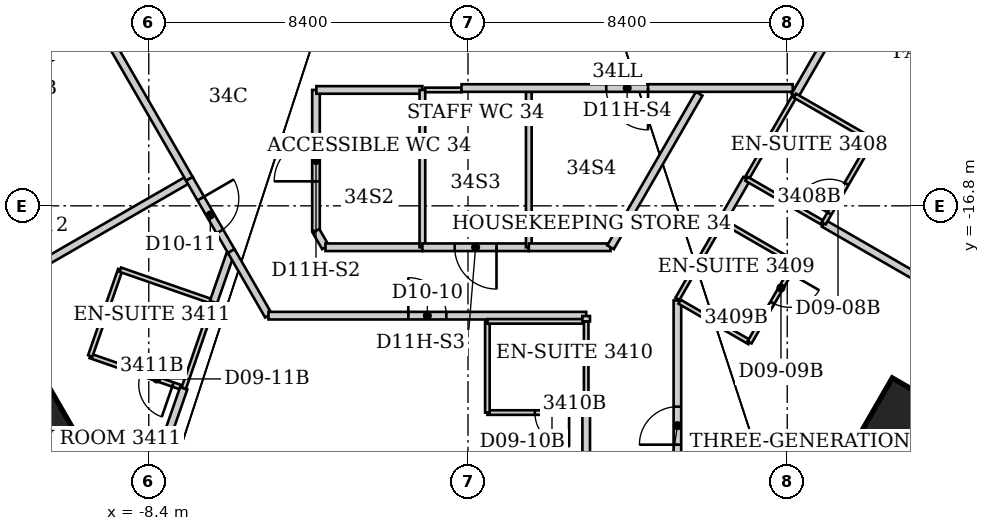
"""IFC4 building model, lengths in metres.
Left out: names, types, materials, properties, quantities, classifications, styles, units other than length and angle.
Written with IfcOpenShell. Run it as: python <this file> out.ifc"""

import sys

from ifc_helpers import new_model, si_unit, direction, frame, frame_2d, origin, origin_2d, place, context, subcontext, project, spatial, rectangle, extrude, element, fill, save


model = new_model("IFC4")
c1 = context("Model", 3, precision=1e-05, world=origin(), true_north=direction((0.0, 1.0)))
c2 = subcontext(c1, "Body", "Model", "MODEL_VIEW")
j1 = project(units=[si_unit("LENGTHUNIT", "METRE"), si_unit("PLANEANGLEUNIT", "RADIAN")], contexts=[c1])
p1 = place(None, origin())
s1 = spatial("IfcSite", under=j1, at=p1, CompositionType="ELEMENT")
p2 = place(p1, origin())
s2 = spatial("IfcBuilding", under=s1, at=p2, CompositionType="ELEMENT")
p3 = place(p2, frame((0.0, 0.0, 138.6)))
s3 = spatial("IfcBuildingStorey", under=s2, at=p3, CompositionType="ELEMENT", Elevation=138.6)
for number, where, z_axis, x_axis in (
    (1, (11.494, -22.559, 0.0), (0.0, 0.0, 1.0), (0.866, -0.5, 0.0)),
    (2, (-11.494, -22.559, 0.0), (0.0, 0.0, 1.0), (-0.866, -0.5, 0.0)),
):
    element("IfcColumn", number, at=place(p3, frame(where, z_axis=z_axis, x_axis=x_axis)), inside=s3, PredefinedType="COLUMN", context=c2, shape_type="SweptSolid", body=[
        extrude(rectangle(XDim=1.8, YDim=1.8, at=origin_2d()), origin(), (0.0, 0.0, 1.0), 3.8),
    ])
p4 = place(p3, frame((-14.246, -20.08, 0.0), z_axis=(0.0, 0.0, 1.0), x_axis=(0.866178955952, 0.49973394548, 0.0)))
e3 = element("IfcWall", 3, at=p4, inside=s3, PredefinedType="PARTITIONING", context=c2, shape_type="SweptSolid", body=[
    extrude(rectangle(XDim=7.969, YDim=0.2, at=frame_2d((3.985, 0.0))), origin(), (0.0, 0.0, 1.0), 3.64),
])
p5 = place(p3, frame((-11.58, -13.27, 0.0), z_axis=(0.0, 0.0, 1.0), x_axis=(0.867428373024, 0.497562074192, 0.0)))
e4 = element("IfcWall", 4, at=p5, inside=s3, PredefinedType="PARTITIONING", context=c2, shape_type="SweptSolid", body=[
    extrude(rectangle(XDim=2.271, YDim=0.12, at=frame_2d((1.136, 0.0))), origin(), (0.0, 0.0, 1.0), 3.64),
])
p6 = place(p3, frame((-9.94, -20.75, 0.0), z_axis=(0.0, 0.0, 1.0), x_axis=(0.94515546045, -0.326620813149, 0.0)))
e5 = element("IfcWall", 5, at=p6, inside=s3, PredefinedType="PARTITIONING", context=c2, shape_type="SweptSolid", body=[
    extrude(rectangle(XDim=2.603, YDim=0.12, at=frame_2d((1.301, 0.0))), origin(), (0.0, 0.0, 1.0), 3.64),
])
p7 = place(p6, frame((1.403, 0.0, 0.0)))
e6 = element("IfcOpeningElement", 6, at=p7, cuts=e5, PredefinedType="OPENING", context=c2, shape_type="SweptSolid", body=[
    extrude(rectangle(XDim=0.9, YDim=2.03, at=frame_2d((0.45, 1.015))), frame((0.0, 0.06, 0.0), z_axis=(0.0, -1.0, 0.0), x_axis=(1.0, 0.0, 0.0)), (0.0, 0.0, 1.0), 0.12),
])
p8 = place(p3, frame((-9.61, -12.14, 0.0), z_axis=(0.0, 0.0, 1.0), x_axis=(0.499898533245, -0.866083977718, 0.0)))
e7 = element("IfcWall", 7, at=p8, inside=s3, PredefinedType="PARTITIONING", context=c2, shape_type="SweptSolid", body=[
    extrude(rectangle(XDim=4.561, YDim=0.2, at=frame_2d((2.281, 0.0))), origin(), (0.0, 0.0, 1.0), 3.64),
])
p9 = place(p3, frame((-9.58, -27.652, 0.0), z_axis=(0.0, 0.0, 1.0), x_axis=(0.327855318627, 0.944727944991, 0.0)))
e8 = element("IfcWall", 8, at=p9, inside=s3, PredefinedType="PARTITIONING", context=c2, shape_type="SweptSolid", body=[
    extrude(rectangle(XDim=6.406, YDim=0.2, at=frame_2d((3.203, 0.0))), origin(), (0.0, 0.0, 1.0), 3.64),
])
p10 = place(p3, frame((-9.15, -18.48, 0.0), z_axis=(0.0, 0.0, 1.0), x_axis=(-0.328693963496, -0.944436487203, 0.0)))
e9 = element("IfcWall", 9, at=p10, inside=s3, PredefinedType="PARTITIONING", context=c2, shape_type="SweptSolid", body=[
    extrude(rectangle(XDim=2.404, YDim=0.12, at=frame_2d((1.202, 0.0))), origin(), (0.0, 0.0, 1.0), 3.64),
])
p11 = place(p3, frame((-7.48, -21.6, 0.0), z_axis=(0.0, 0.0, 1.0), x_axis=(0.326492166492, 0.945199907543, 0.0)))
e10 = element("IfcWall", 10, at=p11, inside=s3, PredefinedType="PARTITIONING", context=c2, shape_type="SweptSolid", body=[
    extrude(rectangle(XDim=2.4, YDim=0.12, at=frame_2d((1.2, 0.0))), origin(), (0.0, 0.0, 1.0), 3.64),
])
p12 = place(p3, frame((-7.331, -16.091, 0.0), z_axis=(0.0, 0.0, 1.0), x_axis=(0.501518373175, -0.865146994081, 0.0)))
e11 = element("IfcWall", 11, at=p12, inside=s3, PredefinedType="PARTITIONING", context=c2, shape_type="SweptSolid", body=[
    extrude(rectangle(XDim=2.196, YDim=0.2, at=frame_2d((1.098, 0.0))), origin(), (0.0, 0.0, 1.0), 3.64),
])
p13 = place(p12, frame((0.598, 0.0, 0.0)))
e12 = element("IfcOpeningElement", 12, at=p13, cuts=e11, PredefinedType="OPENING", context=c2, shape_type="SweptSolid", body=[
    extrude(rectangle(XDim=1.0, YDim=2.13, at=frame_2d((0.5, 1.065))), frame((0.0, 0.1, 0.0), z_axis=(0.0, -1.0, 0.0), x_axis=(1.0, 0.0, 0.0)), (0.0, 0.0, 1.0), 0.2),
])
p14 = place(p3, frame((-6.7, -19.33, 0.0), z_axis=(0.0, 0.0, 1.0), x_axis=(-0.944753042377, 0.327782990589, 0.0)))
e13 = element("IfcWall", 13, at=p14, inside=s3, PredefinedType="PARTITIONING", context=c2, shape_type="SweptSolid", body=[
    extrude(rectangle(XDim=2.594, YDim=0.12, at=frame_2d((1.297, 0.0))), origin(), (0.0, 0.0, 1.0), 3.64),
])
p15 = place(p3, frame((-6.696, -19.331, 0.0), z_axis=(0.0, 0.0, 1.0), x_axis=(0.328298231075, 0.944574121746, 0.0)))
e14 = element("IfcWall", 14, at=p15, inside=s3, PredefinedType="PARTITIONING", context=c2, shape_type="SweptSolid", body=[
    extrude(rectangle(XDim=1.32, YDim=0.2, at=frame_2d((0.66, 0.0))), origin(), (0.0, 0.0, 1.0), 3.64),
])
p16 = place(p3, frame((-6.23, -17.99, 0.0), z_axis=(0.0, 0.0, 1.0), x_axis=(0.499431599995, -0.866353321068, 0.0)))
e15 = element("IfcWall", 15, at=p16, inside=s3, PredefinedType="PARTITIONING", context=c2, shape_type="SweptSolid", body=[
    extrude(rectangle(XDim=1.962, YDim=0.2, at=frame_2d((0.981, 0.0))), origin(), (0.0, 0.0, 1.0), 3.64),
])
p17 = place(p3, frame((-5.25, -19.69, 0.0), z_axis=(0.0, 0.0, 1.0), x_axis=(1.0, 0.0, 0.0)))
e16 = element("IfcWall", 16, at=p17, inside=s3, PredefinedType="PARTITIONING", context=c2, shape_type="SweptSolid", body=[
    extrude(rectangle(XDim=8.36, YDim=0.2, at=frame_2d((4.18, 0.0))), origin(), (0.0, 0.0, 1.0), 3.64),
])
p18 = place(p17, frame((3.68, 0.0, 0.0)))
e17 = element("IfcOpeningElement", 17, at=p18, cuts=e16, PredefinedType="OPENING", context=c2, shape_type="SweptSolid", body=[
    extrude(rectangle(XDim=1.0, YDim=2.13, at=frame_2d((0.5, 1.065))), frame((0.0, 0.1, 0.0), z_axis=(0.0, -1.0, 0.0), x_axis=(1.0, 0.0, 0.0)), (0.0, 0.0, 1.0), 0.2),
])
p19 = place(p3, frame((-4.0, -17.46, 0.0), z_axis=(0.0, 0.0, 1.0), x_axis=(0.0, 1.0, 0.0)))
e18 = element("IfcWall", 18, at=p19, inside=s3, PredefinedType="PARTITIONING", context=c2, shape_type="SweptSolid", body=[
    extrude(rectangle(XDim=3.71, YDim=0.2, at=frame_2d((1.855, 0.0))), origin(), (0.0, 0.0, 1.0), 2.878),
])
p20 = place(p19, frame((1.305, 0.0, 0.0)))
e19 = element("IfcOpeningElement", 19, at=p20, cuts=e18, PredefinedType="OPENING", context=c2, shape_type="SweptSolid", body=[
    extrude(rectangle(XDim=1.1, YDim=2.2, at=frame_2d((0.55, 1.1))), frame((0.0, 0.1, 0.0), z_axis=(0.0, -1.0, 0.0), x_axis=(1.0, 0.0, 0.0)), (0.0, 0.0, 1.0), 0.2),
])
p21 = place(p3, frame((-3.99, -13.75, 0.0), z_axis=(0.0, 0.0, 1.0), x_axis=(1.0, 0.0, 0.0)))
e20 = element("IfcWall", 20, at=p21, inside=s3, PredefinedType="PARTITIONING", context=c2, shape_type="SweptSolid", body=[
    extrude(rectangle(XDim=2.79, YDim=0.2, at=frame_2d((1.395, 0.0))), origin(), (0.0, 0.0, 1.0), 3.64),
])
p22 = place(p3, frame((-3.75, -17.89, 0.0), z_axis=(0.0, 0.0, 1.0), x_axis=(-0.502680181512, 0.864472460588, 0.0)))
e21 = element("IfcWall", 21, at=p22, inside=s3, PredefinedType="PARTITIONING", context=c2, shape_type="SweptSolid", body=[
    extrude(rectangle(XDim=0.497, YDim=0.2, at=frame_2d((0.249, 0.0))), origin(), (0.0, 0.0, 1.0), 3.64),
])
p23 = place(p3, frame((-1.2, -17.89, 0.0), z_axis=(0.0, 0.0, 1.0), x_axis=(-1.0, 0.0, 0.0)))
e22 = element("IfcWall", 22, at=p23, inside=s3, PredefinedType="PARTITIONING", context=c2, shape_type="SweptSolid", body=[
    extrude(rectangle(XDim=2.55, YDim=0.2, at=frame_2d((1.275, 0.0))), origin(), (0.0, 0.0, 1.0), 3.64),
])
p24 = place(p3, frame((-1.2, -13.75, 0.0), z_axis=(0.0, 0.0, 1.0), x_axis=(0.0, -1.0, 0.0)))
e23 = element("IfcWall", 23, at=p24, inside=s3, PredefinedType="PARTITIONING", context=c2, shape_type="SweptSolid", body=[
    extrude(rectangle(XDim=4.14, YDim=0.15, at=frame_2d((2.07, 0.0))), origin(), (0.0, 0.0, 1.0), 3.64),
])
p25 = place(p3, frame((-1.125, -13.75, 0.0), z_axis=(0.0, 0.0, 1.0), x_axis=(1.0, 0.0, 0.0)))
e24 = element("IfcWall", 24, at=p25, inside=s3, PredefinedType="PARTITIONING", context=c2, shape_type="SweptSolid", body=[
    extrude(rectangle(XDim=0.955, YDim=0.12, at=frame_2d((0.478, 0.0))), origin(), (0.0, 0.0, 1.0), 3.64),
])
p26 = place(p3, frame((0.51, -22.24, 0.0), z_axis=(0.0, 0.0, 1.0), x_axis=(1.0, 0.0, 0.0)))
e25 = element("IfcWall", 25, at=p26, inside=s3, PredefinedType="PARTITIONING", context=c2, shape_type="SweptSolid", body=[
    extrude(rectangle(XDim=2.6, YDim=0.12, at=frame_2d((1.3, 0.0))), origin(), (0.0, 0.0, 1.0), 3.64),
])
p27 = place(p26, frame((1.25, 0.0, 0.0)))
e26 = element("IfcOpeningElement", 26, at=p27, cuts=e25, PredefinedType="OPENING", context=c2, shape_type="SweptSolid", body=[
    extrude(rectangle(XDim=0.9, YDim=2.03, at=frame_2d((0.45, 1.015))), frame((0.0, 0.06, 0.0), z_axis=(0.0, -1.0, 0.0), x_axis=(1.0, 0.0, 0.0)), (0.0, 0.0, 1.0), 0.12),
])
p28 = place(p3, frame((0.51, -19.84, 0.0), z_axis=(0.0, 0.0, 1.0), x_axis=(0.0, -1.0, 0.0)))
e27 = element("IfcWall", 27, at=p28, inside=s3, PredefinedType="PARTITIONING", context=c2, shape_type="SweptSolid", body=[
    extrude(rectangle(XDim=2.4, YDim=0.12, at=frame_2d((1.2, 0.0))), origin(), (0.0, 0.0, 1.0), 3.64),
])
p29 = place(p3, frame((1.6, -17.89, 0.0), z_axis=(0.0, 0.0, 1.0), x_axis=(-1.0, 0.0, 0.0)))
e28 = element("IfcWall", 28, at=p29, inside=s3, PredefinedType="PARTITIONING", context=c2, shape_type="SweptSolid", body=[
    extrude(rectangle(XDim=2.8, YDim=0.2, at=frame_2d((1.4, 0.0))), origin(), (0.0, 0.0, 1.0), 3.64),
])
p30 = place(p29, frame((0.85, 0.0, 0.0)))
e29 = element("IfcOpeningElement", 29, at=p30, cuts=e28, PredefinedType="OPENING", context=c2, shape_type="SweptSolid", body=[
    extrude(rectangle(XDim=1.1, YDim=2.2, at=frame_2d((0.55, 1.1))), frame((0.0, 0.1, 0.0), z_axis=(0.0, -1.0, 0.0), x_axis=(1.0, 0.0, 0.0)), (0.0, 0.0, 1.0), 0.2),
])
p31 = place(p3, frame((1.6, -13.8, 0.0), z_axis=(0.0, 0.0, 1.0), x_axis=(0.0, -1.0, 0.0)))
e30 = element("IfcWall", 30, at=p31, inside=s3, PredefinedType="PARTITIONING", context=c2, shape_type="SweptSolid", body=[
    extrude(rectangle(XDim=4.09, YDim=0.15, at=frame_2d((2.045, 0.0))), origin(), (0.0, 0.0, 1.0), 3.64),
])
p32 = place(p3, frame((3.11, -22.24, 0.0), z_axis=(0.0, 0.0, 1.0), x_axis=(0.0, -1.0, 0.0)))
e31 = element("IfcWall", 31, at=p32, inside=s3, PredefinedType="PARTITIONING", context=c2, shape_type="SweptSolid", body=[
    extrude(rectangle(XDim=3.64, YDim=0.2, at=frame_2d((1.82, 0.0))), origin(), (0.0, 0.0, 1.0), 3.64),
])
p33 = place(p3, frame((3.11, -19.84, 0.0), z_axis=(0.0, 0.0, 1.0), x_axis=(-1.0, 0.0, 0.0)))
e32 = element("IfcWall", 32, at=p33, inside=s3, PredefinedType="PARTITIONING", context=c2, shape_type="SweptSolid", body=[
    extrude(rectangle(XDim=2.6, YDim=0.12, at=frame_2d((1.3, 0.0))), origin(), (0.0, 0.0, 1.0), 3.64),
])
p34 = place(p3, frame((3.11, -19.84, 0.0), z_axis=(0.0, 0.0, 1.0), x_axis=(0.0, -1.0, 0.0)))
e33 = element("IfcWall", 33, at=p34, inside=s3, PredefinedType="PARTITIONING", context=c2, shape_type="SweptSolid", body=[
    extrude(rectangle(XDim=2.4, YDim=0.12, at=frame_2d((1.2, 0.0))), origin(), (0.0, 0.0, 1.0), 3.64),
])
p35 = place(p3, frame((3.11, -19.7, 0.0), z_axis=(0.0, 0.0, 1.0), x_axis=(0.0, -1.0, 0.0)))
e34 = element("IfcWall", 34, at=p35, inside=s3, PredefinedType="PARTITIONING", context=c2, shape_type="SweptSolid", body=[
    extrude(rectangle(XDim=0.14, YDim=0.2, at=frame_2d((0.07, 0.0))), origin(), (0.0, 0.0, 1.0), 3.64),
])
p36 = place(p3, frame((3.75, -17.89, 0.0), z_axis=(0.0, 0.0, 1.0), x_axis=(-1.0, 0.0, 0.0)))
e35 = element("IfcWall", 35, at=p36, inside=s3, PredefinedType="PARTITIONING", context=c2, shape_type="SweptSolid", body=[
    extrude(rectangle(XDim=2.15, YDim=0.2, at=frame_2d((1.075, 0.0))), origin(), (0.0, 0.0, 1.0), 3.64),
])
p37 = place(p3, frame((5.51, -25.88, 0.0), z_axis=(0.0, 0.0, 1.0), x_axis=(0.0, 1.0, 0.0)))
e36 = element("IfcWall", 36, at=p37, inside=s3, PredefinedType="PARTITIONING", context=c2, shape_type="SweptSolid", body=[
    extrude(rectangle(XDim=6.59, YDim=0.2, at=frame_2d((3.295, 0.0))), origin(), (0.0, 0.0, 1.0), 3.64),
])
p38 = place(p37, frame((2.795, 0.0, 0.0)))
e37 = element("IfcOpeningElement", 37, at=p38, cuts=e36, PredefinedType="OPENING", context=c2, shape_type="SweptSolid", body=[
    extrude(rectangle(XDim=1.0, YDim=2.13, at=frame_2d((0.5, 1.065))), frame((0.0, 0.1, 0.0), z_axis=(0.0, -1.0, 0.0), x_axis=(1.0, 0.0, 0.0)), (0.0, 0.0, 1.0), 0.2),
])
p39 = place(p3, frame((5.51, -19.25, 0.0), z_axis=(0.0, 0.0, 1.0), x_axis=(0.498837591974, 0.866695481028, 0.0)))
e38 = element("IfcWall", 38, at=p39, inside=s3, PredefinedType="PARTITIONING", context=c2, shape_type="SweptSolid", body=[
    extrude(rectangle(XDim=2.365, YDim=0.12, at=frame_2d((1.183, 0.0))), origin(), (0.0, 0.0, 1.0), 3.64),
])
p40 = place(p3, frame((5.566, -19.323, 0.0), z_axis=(0.0, 0.0, 1.0), x_axis=(0.865436746432, -0.501018201192, 0.0)))
e39 = element("IfcWall", 39, at=p40, inside=s3, PredefinedType="PARTITIONING", context=c2, shape_type="SweptSolid", body=[
    extrude(rectangle(XDim=2.13, YDim=0.12, at=frame_2d((1.065, 0.0))), origin(), (0.0, 0.0, 1.0), 3.64),
])
p41 = place(p3, frame((6.083, -13.85, 0.0), z_axis=(0.0, 0.0, 1.0), x_axis=(-0.499977643516, -0.866038310922, 0.0)))
e40 = element("IfcWall", 40, at=p41, inside=s3, PredefinedType="PARTITIONING", context=c2, shape_type="SweptSolid", body=[
    extrude(rectangle(XDim=4.665, YDim=0.2, at=frame_2d((2.333, 0.0))), origin(), (0.0, 0.0, 1.0), 3.64),
])
p42 = place(p3, frame((6.69, -17.2, 0.0), z_axis=(0.0, 0.0, 1.0), x_axis=(0.499623473928, 0.866242682105, 0.0)))
e41 = element("IfcWall", 41, at=p42, inside=s3, PredefinedType="PARTITIONING", context=c2, shape_type="SweptSolid", body=[
    extrude(rectangle(XDim=1.281, YDim=0.2, at=frame_2d((0.641, 0.0))), origin(), (0.0, 0.0, 1.0), 3.64),
])
p43 = place(p3, frame((7.33, -16.09, 0.0), z_axis=(0.0, 0.0, 1.0), x_axis=(0.501632941931, 0.865080569409, 0.0)))
e42 = element("IfcWall", 42, at=p43, inside=s3, PredefinedType="PARTITIONING", context=c2, shape_type="SweptSolid", body=[
    extrude(rectangle(XDim=2.532, YDim=0.12, at=frame_2d((1.266, 0.0))), origin(), (0.0, 0.0, 1.0), 3.64),
])
p44 = place(p3, frame((7.33, -16.09, 0.0), z_axis=(0.0, 0.0, 1.0), x_axis=(0.866202934772, -0.499692381163, 0.0)))
e43 = element("IfcWall", 43, at=p44, inside=s3, PredefinedType="PARTITIONING", context=c2, shape_type="SweptSolid", body=[
    extrude(rectangle(XDim=2.343, YDim=0.12, at=frame_2d((1.171, 0.0))), origin(), (0.0, 0.0, 1.0), 3.64),
])
p45 = place(p3, frame((7.41, -20.39, 0.0), z_axis=(0.0, 0.0, 1.0), x_axis=(0.499737123639, 0.866177122335, 0.0)))
e44 = element("IfcWall", 44, at=p45, inside=s3, PredefinedType="PARTITIONING", context=c2, shape_type="SweptSolid", body=[
    extrude(rectangle(XDim=2.401, YDim=0.12, at=frame_2d((1.201, 0.0))), origin(), (0.0, 0.0, 1.0), 3.64),
])
p46 = place(p45, frame((1.201, 0.0, 0.0)))
e45 = element("IfcOpeningElement", 45, at=p46, cuts=e44, PredefinedType="OPENING", context=c2, shape_type="SweptSolid", body=[
    extrude(rectangle(XDim=0.9, YDim=2.03, at=frame_2d((0.45, 1.015))), frame((0.0, 0.06, 0.0), z_axis=(0.0, -1.0, 0.0), x_axis=(1.0, 0.0, 0.0)), (0.0, 0.0, 1.0), 0.12),
])
p47 = place(p3, frame((8.545, -13.7, 0.0), z_axis=(0.0, 0.0, 1.0), x_axis=(-1.0, 0.0, 0.0)))
e46 = element("IfcWall", 46, at=p47, inside=s3, PredefinedType="PARTITIONING", context=c2, shape_type="SweptSolid", body=[
    extrude(rectangle(XDim=8.715, YDim=0.2, at=frame_2d((4.357, 0.0))), origin(), (0.0, 0.0, 1.0), 3.64),
])
p48 = place(p47, frame((3.808, 0.0, 0.0)))
e47 = element("IfcOpeningElement", 47, at=p48, cuts=e46, PredefinedType="OPENING", context=c2, shape_type="SweptSolid", body=[
    extrude(rectangle(XDim=1.1, YDim=2.2, at=frame_2d((0.55, 1.1))), frame((0.0, 0.1, 0.0), z_axis=(0.0, -1.0, 0.0), x_axis=(1.0, 0.0, 0.0)), (0.0, 0.0, 1.0), 0.2),
])
p49 = place(p3, frame((8.6, -13.9, 0.0), z_axis=(0.0, 0.0, 1.0), x_axis=(0.499505868716, 0.866310502717, 0.0)))
e48 = element("IfcWall", 48, at=p49, inside=s3, PredefinedType="PARTITIONING", context=c2, shape_type="SweptSolid", body=[
    extrude(rectangle(XDim=8.588, YDim=0.2, at=frame_2d((4.294, 0.0))), origin(), (0.0, 0.0, 1.0), 3.64),
])
p50 = place(p49, frame((3.794, 0.0, 0.0)))
e49 = element("IfcOpeningElement", 49, at=p50, cuts=e48, PredefinedType="OPENING", context=c2, shape_type="SweptSolid", body=[
    extrude(rectangle(XDim=1.0, YDim=2.13, at=frame_2d((0.5, 1.065))), frame((0.0, 0.1, 0.0), z_axis=(0.0, -1.0, 0.0), x_axis=(1.0, 0.0, 0.0)), (0.0, 0.0, 1.0), 0.2),
])
p51 = place(p3, frame((8.61, -18.31, 0.0), z_axis=(0.0, 0.0, 1.0), x_axis=(-0.865732595383, 0.500506816428, 0.0)))
e50 = element("IfcWall", 50, at=p51, inside=s3, PredefinedType="PARTITIONING", context=c2, shape_type="SweptSolid", body=[
    extrude(rectangle(XDim=2.218, YDim=0.12, at=frame_2d((1.109, 0.0))), origin(), (0.0, 0.0, 1.0), 3.64),
])
p52 = place(p3, frame((9.359, -17.261, 0.0), z_axis=(0.0, 0.0, 1.0), x_axis=(0.866179822479, -0.499732443544, 0.0)))
e51 = element("IfcWall", 51, at=p52, inside=s3, PredefinedType="PARTITIONING", context=c2, shape_type="SweptSolid", body=[
    extrude(rectangle(XDim=5.642, YDim=0.2, at=frame_2d((2.821, 0.0))), origin(), (0.0, 0.0, 1.0), 3.64),
])
p53 = place(p3, frame((9.36, -17.26, 0.0), z_axis=(0.0, 0.0, 1.0), x_axis=(0.501602618681, 0.865098152196, 0.0)))
e52 = element("IfcWall", 52, at=p53, inside=s3, PredefinedType="PARTITIONING", context=c2, shape_type="SweptSolid", body=[
    extrude(rectangle(XDim=2.531, YDim=0.12, at=frame_2d((1.266, 0.0))), origin(), (0.0, 0.0, 1.0), 3.64),
])
p54 = place(p53, frame((0.3, 0.0, 0.0)))
e53 = element("IfcOpeningElement", 53, at=p54, cuts=e52, PredefinedType="OPENING", context=c2, shape_type="SweptSolid", body=[
    extrude(rectangle(XDim=0.9, YDim=2.03, at=frame_2d((0.45, 1.015))), frame((0.0, 0.06, 0.0), z_axis=(0.0, -1.0, 0.0), x_axis=(1.0, 0.0, 0.0)), (0.0, 0.0, 1.0), 0.12),
])
p55 = place(p3, frame((10.63, -15.07, 0.0), z_axis=(0.0, 0.0, 1.0), x_axis=(-0.866345142729, 0.499445786517, 0.0)))
e54 = element("IfcWall", 54, at=p55, inside=s3, PredefinedType="PARTITIONING", context=c2, shape_type="SweptSolid", body=[
    extrude(rectangle(XDim=2.343, YDim=0.12, at=frame_2d((1.171, 0.0))), origin(), (0.0, 0.0, 1.0), 3.64),
])
p56 = place(p54, origin())
e55 = element("IfcDoor", 55, at=p56, inside=s3, OperationType="SINGLE_SWING_LEFT", PredefinedType="DOOR", context=c2, shape_type="SweptSolid", body=[
    extrude(rectangle(XDim=0.9, YDim=2.03, at=frame_2d((0.45, 1.015))), frame((0.0, 0.025, 0.0), z_axis=(0.0, -1.0, 0.0), x_axis=(1.0, 0.0, 0.0)), (0.0, 0.0, 1.0), 0.05),
])
fill(e53, e55)
p57 = place(p38, origin())
e56 = element("IfcDoor", 56, at=p57, inside=s3, OperationType="SINGLE_SWING_LEFT", PredefinedType="DOOR", context=c2, shape_type="SweptSolid", body=[
    extrude(rectangle(XDim=1.0, YDim=2.13, at=frame_2d((0.5, 1.065))), frame((0.0, 0.025, 0.0), z_axis=(0.0, -1.0, 0.0), x_axis=(1.0, 0.0, 0.0)), (0.0, 0.0, 1.0), 0.05),
])
fill(e37, e56)
p58 = place(p46, origin())
e57 = element("IfcDoor", 57, at=p58, inside=s3, OperationType="SINGLE_SWING_RIGHT", PredefinedType="DOOR", context=c2, shape_type="SweptSolid", body=[
    extrude(rectangle(XDim=0.9, YDim=2.03, at=frame_2d((0.45, 1.015))), frame((0.0, 0.025, 0.0), z_axis=(0.0, -1.0, 0.0), x_axis=(1.0, 0.0, 0.0)), (0.0, 0.0, 1.0), 0.05),
])
fill(e45, e57)
p59 = place(p18, origin())
e58 = element("IfcDoor", 58, at=p59, inside=s3, OperationType="SINGLE_SWING_LEFT", PredefinedType="DOOR", context=c2, shape_type="SweptSolid", body=[
    extrude(rectangle(XDim=1.0, YDim=2.13, at=frame_2d((0.5, 1.065))), frame((0.0, 0.025, 0.0), z_axis=(0.0, -1.0, 0.0), x_axis=(1.0, 0.0, 0.0)), (0.0, 0.0, 1.0), 0.05),
])
fill(e17, e58)
p60 = place(p27, origin())
e59 = element("IfcDoor", 59, at=p60, inside=s3, OperationType="SINGLE_SWING_RIGHT", PredefinedType="DOOR", context=c2, shape_type="SweptSolid", body=[
    extrude(rectangle(XDim=0.9, YDim=2.03, at=frame_2d((0.45, 1.015))), frame((0.0, 0.025, 0.0), z_axis=(0.0, -1.0, 0.0), x_axis=(1.0, 0.0, 0.0)), (0.0, 0.0, 1.0), 0.05),
])
fill(e26, e59)
p61 = place(p13, origin())
e60 = element("IfcDoor", 60, at=p61, inside=s3, OperationType="SINGLE_SWING_LEFT", PredefinedType="DOOR", context=c2, shape_type="SweptSolid", body=[
    extrude(rectangle(XDim=1.0, YDim=2.13, at=frame_2d((0.5, 1.065))), frame((0.0, 0.025, 0.0), z_axis=(0.0, -1.0, 0.0), x_axis=(1.0, 0.0, 0.0)), (0.0, 0.0, 1.0), 0.05),
])
fill(e12, e60)
p62 = place(p7, origin())
e61 = element("IfcDoor", 61, at=p62, inside=s3, OperationType="SINGLE_SWING_RIGHT", PredefinedType="DOOR", context=c2, shape_type="SweptSolid", body=[
    extrude(rectangle(XDim=0.9, YDim=2.03, at=frame_2d((0.45, 1.015))), frame((0.0, 0.025, 0.0), z_axis=(0.0, -1.0, 0.0), x_axis=(1.0, 0.0, 0.0)), (0.0, 0.0, 1.0), 0.05),
])
fill(e6, e61)
p63 = place(p20, origin())
e62 = element("IfcDoor", 62, at=p63, inside=s3, OperationType="SINGLE_SWING_LEFT", PredefinedType="DOOR", context=c2, shape_type="SweptSolid", body=[
    extrude(rectangle(XDim=1.1, YDim=2.2, at=frame_2d((0.55, 1.1))), frame((0.0, 0.025, 0.0), z_axis=(0.0, -1.0, 0.0), x_axis=(1.0, 0.0, 0.0)), (0.0, 0.0, 1.0), 0.05),
])
fill(e19, e62)
p64 = place(p30, origin())
e63 = element("IfcDoor", 63, at=p64, inside=s3, OperationType="SINGLE_SWING_LEFT", PredefinedType="DOOR", context=c2, shape_type="SweptSolid", body=[
    extrude(rectangle(XDim=1.1, YDim=2.2, at=frame_2d((0.55, 1.1))), frame((0.0, 0.025, 0.0), z_axis=(0.0, -1.0, 0.0), x_axis=(1.0, 0.0, 0.0)), (0.0, 0.0, 1.0), 0.05),
])
fill(e29, e63)
p65 = place(p48, origin())
e64 = element("IfcDoor", 64, at=p65, inside=s3, OperationType="SINGLE_SWING_LEFT", PredefinedType="DOOR", context=c2, shape_type="SweptSolid", body=[
    extrude(rectangle(XDim=1.1, YDim=2.2, at=frame_2d((0.55, 1.1))), frame((0.0, 0.025, 0.0), z_axis=(0.0, -1.0, 0.0), x_axis=(1.0, 0.0, 0.0)), (0.0, 0.0, 1.0), 0.05),
])
fill(e47, e64)
save(model, sys.argv[1])
